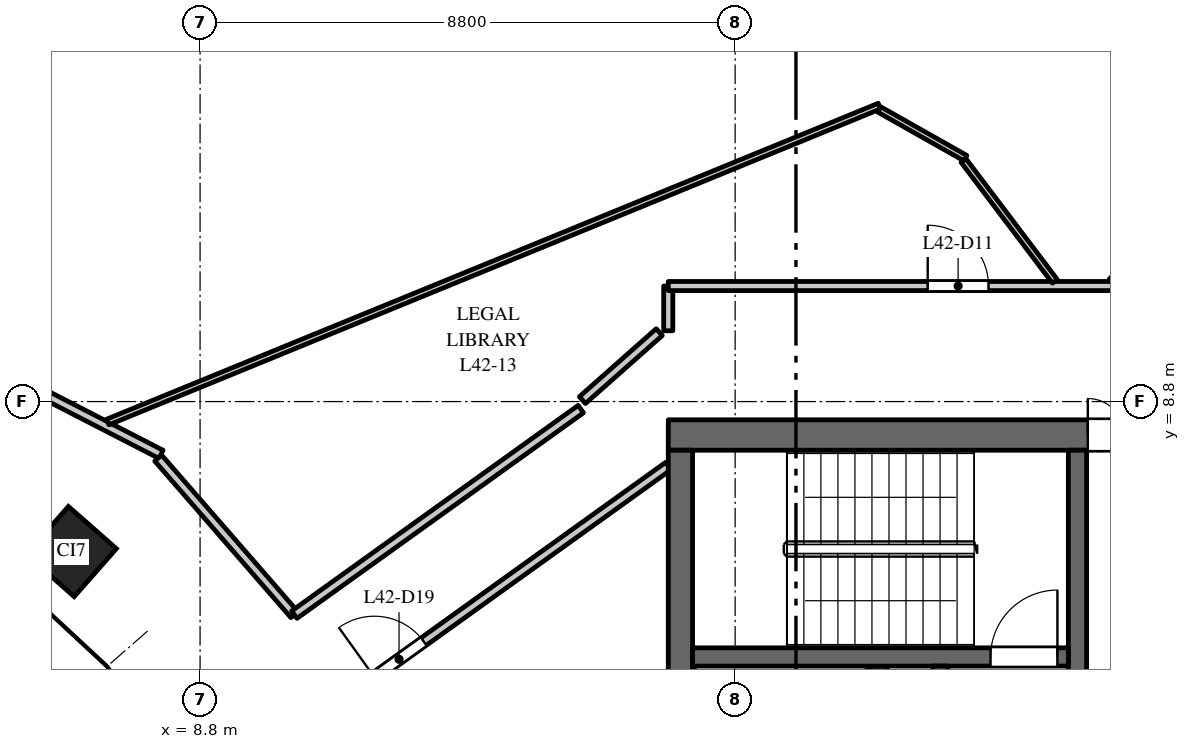
"""IFC4 building model, lengths in metres.
Left out: names, types, materials, properties, quantities, classifications, styles, units other than length and angle.
Written with IfcOpenShell. Run it as: python <this file> out.ifc"""

import sys

from ifc_helpers import new_model, si_unit, direction, frame, frame_2d, origin, origin_2d, place, context, subcontext, project, spatial, rectangle, extrude, element, fill, save


model = new_model("IFC4")
c1 = context("Model", 3, precision=1e-05, world=origin(), true_north=direction((0.0, 1.0)))
c2 = subcontext(c1, "Body", "Model", "MODEL_VIEW")
j1 = project(units=[si_unit("LENGTHUNIT", "METRE"), si_unit("PLANEANGLEUNIT", "RADIAN")], contexts=[c1])
p1 = place(None, origin())
s1 = spatial("IfcSite", under=j1, at=p1, CompositionType="ELEMENT")
p2 = place(p1, origin())
s2 = spatial("IfcBuilding", under=s1, at=p2, CompositionType="ELEMENT")
p3 = place(p2, frame((0.0, 0.0, 182.0)))
s3 = spatial("IfcBuildingStorey", under=s2, at=p3, CompositionType="ELEMENT", Elevation=182.0)
p4 = place(p3, frame((6.682, 6.334, 0.0), z_axis=(0.0, 0.0, 1.0), x_axis=(-0.75102249095, 0.660276622399, 0.0)))
e1 = element("IfcColumn", 1, at=p4, inside=s3, PredefinedType="COLUMN", context=c2, shape_type="SweptSolid", body=[
    extrude(rectangle(XDim=1.05, YDim=1.05, at=origin_2d()), origin(), (0.0, 0.0, 1.0), 4.0),
])
p5 = place(p3, frame((16.5, 8.25, 0.0), z_axis=(0.0, 0.0, 1.0), x_axis=(1.0, 0.0, 0.0)))
e2 = element("IfcWall", 2, at=p5, inside=s3, PredefinedType="SHEAR", context=c2, shape_type="SweptSolid", body=[
    extrude(rectangle(XDim=15.0, YDim=0.5, at=frame_2d((7.5, 0.0))), origin(), (0.0, 0.0, 1.0), 3.7),
])
p6 = place(p5, frame((6.9, 0.0, 0.0)))
e3 = element("IfcOpeningElement", 3, at=p6, cuts=e2, PredefinedType="OPENING", context=c2, shape_type="SweptSolid", body=[
    extrude(rectangle(XDim=1.2, YDim=2.1, at=frame_2d((0.6, 1.05))), frame((0.0, 0.26, 0.0), z_axis=(0.0, -1.0, 0.0), x_axis=(1.0, 0.0, 0.0)), (0.0, 0.0, 1.0), 0.52),
])
p7 = place(p5, frame((12.275, 0.0, 0.0)))
e4 = element("IfcOpeningElement", 4, at=p7, cuts=e2, PredefinedType="OPENING", context=c2, shape_type="SweptSolid", body=[
    extrude(rectangle(XDim=0.9, YDim=2.1, at=frame_2d((0.45, 1.05))), frame((0.0, 0.26, 0.0), z_axis=(0.0, -1.0, 0.0), x_axis=(1.0, 0.0, 0.0)), (0.0, 0.0, 1.0), 0.52),
])
p8 = place(p3, frame((19.95, -4.45, 0.0), z_axis=(0.0, 0.0, 1.0), x_axis=(0.0, 1.0, 0.0)))
e5 = element("IfcWall", 5, at=p8, inside=s3, PredefinedType="SHEAR", context=c2, shape_type="SweptSolid", body=[
    extrude(rectangle(XDim=8.9, YDim=0.3, at=frame_2d((4.45, 0.0))), origin(), (0.0, 0.0, 1.0), 3.7),
])
p9 = place(p8, frame((0.775, 0.0, 0.0)))
e6 = element("IfcOpeningElement", 6, at=p9, cuts=e5, PredefinedType="OPENING", context=c2, shape_type="SweptSolid", body=[
    extrude(rectangle(XDim=1.2, YDim=2.1, at=frame_2d((0.6, 1.05))), frame((0.0, 0.16, 0.0), z_axis=(0.0, -1.0, 0.0), x_axis=(1.0, 0.0, 0.0)), (0.0, 0.0, 1.0), 0.32),
])
p10 = place(p8, frame((4.675, 0.0, 0.0)))
e7 = element("IfcOpeningElement", 7, at=p10, cuts=e5, PredefinedType="OPENING", context=c2, shape_type="SweptSolid", body=[
    extrude(rectangle(XDim=1.1, YDim=2.1, at=frame_2d((0.55, 1.05))), frame((0.0, 0.16, 0.0), z_axis=(0.0, -1.0, 0.0), x_axis=(1.0, 0.0, 0.0)), (0.0, 0.0, 1.0), 0.32),
])
p11 = place(p8, frame((7.25, 0.0, 0.0)))
e8 = element("IfcOpeningElement", 8, at=p11, cuts=e5, PredefinedType="OPENING", context=c2, shape_type="SweptSolid", body=[
    extrude(rectangle(XDim=1.1, YDim=2.1, at=frame_2d((0.55, 1.05))), frame((0.0, 0.16, 0.0), z_axis=(0.0, -1.0, 0.0), x_axis=(1.0, 0.0, 0.0)), (0.0, 0.0, 1.0), 0.32),
])
p12 = place(p3, frame((16.7, -8.0, 0.0), z_axis=(0.0, 0.0, 1.0), x_axis=(0.0, 1.0, 0.0)))
e9 = element("IfcWall", 9, at=p12, inside=s3, PredefinedType="SHEAR", context=c2, shape_type="SweptSolid", body=[
    extrude(rectangle(XDim=16.0, YDim=0.4, at=frame_2d((8.0, 0.0))), origin(), (0.0, 0.0, 1.0), 3.7),
])
p13 = place(p3, frame((23.23, 2.25, 0.0), z_axis=(0.0, 0.0, 1.0), x_axis=(0.0, 1.0, 0.0)))
e10 = element("IfcWall", 10, at=p13, inside=s3, PredefinedType="SHEAR", context=c2, shape_type="SweptSolid", body=[
    extrude(rectangle(XDim=5.75, YDim=0.3, at=frame_2d((2.875, 0.0))), origin(), (0.0, 0.0, 1.0), 3.7),
])
p14 = place(p13, frame((0.6, 0.0, 0.0)))
e11 = element("IfcOpeningElement", 11, at=p14, cuts=e10, PredefinedType="OPENING", context=c2, shape_type="SweptSolid", body=[
    extrude(rectangle(XDim=1.0, YDim=2.1, at=frame_2d((0.5, 1.05))), frame((0.0, 0.16, 0.0), z_axis=(0.0, -1.0, 0.0), x_axis=(1.0, 0.0, 0.0)), (0.0, 0.0, 1.0), 0.32),
])
p15 = place(p3, frame((16.9, 4.6, 0.0), z_axis=(0.0, 0.0, 1.0), x_axis=(1.0, 0.0, 0.0)))
e12 = element("IfcWall", 12, at=p15, inside=s3, PredefinedType="SHEAR", context=c2, shape_type="SweptSolid", body=[
    extrude(rectangle(XDim=6.18, YDim=0.3, at=frame_2d((3.09, 0.0))), origin(), (0.0, 0.0, 1.0), 3.7),
])
p16 = place(p15, frame((4.9, 0.0, 0.0)))
e13 = element("IfcOpeningElement", 13, at=p16, cuts=e12, PredefinedType="OPENING", context=c2, shape_type="SweptSolid", body=[
    extrude(rectangle(XDim=1.1, YDim=2.1, at=frame_2d((0.55, 1.05))), frame((0.0, 0.16, 0.0), z_axis=(0.0, -1.0, 0.0), x_axis=(1.0, 0.0, 0.0)), (0.0, 0.0, 1.0), 0.32),
])
p17 = place(p3, frame((20.975, 2.25, 0.0), z_axis=(0.0, 0.0, 1.0), x_axis=(0.0, 1.0, 0.0)))
e14 = element("IfcWall", 14, at=p17, inside=s3, PredefinedType="SHEAR", context=c2, shape_type="SweptSolid", body=[
    extrude(rectangle(XDim=2.2, YDim=0.25, at=frame_2d((1.1, 0.0))), origin(), (0.0, 0.0, 1.0), 3.7),
])
p18 = place(p3, frame((4.337, 9.896, 0.0), z_axis=(0.0, 0.0, 1.0), x_axis=(0.889382211946, -0.457164391739, 0.0)))
e15 = element("IfcWall", 15, at=p18, inside=s3, PredefinedType="PARTITIONING", context=c2, shape_type="SweptSolid", body=[
    extrude(rectangle(XDim=4.296, YDim=0.15, at=frame_2d((2.148, 0.0))), origin(), (0.0, 0.0, 1.0), 2.85),
])
p19 = place(p3, frame((7.283, 8.464, 0.0), z_axis=(0.0, 0.0, 1.0), x_axis=(0.925447652154, 0.378875498182, 0.0)))
e16 = element("IfcWall", 16, at=p19, inside=s3, PredefinedType="PARTITIONING", context=c2, shape_type="SweptSolid", body=[
    extrude(rectangle(XDim=13.711, YDim=0.1, at=frame_2d((6.855, 0.0))), origin(), (0.0, 0.0, 1.0), 3.7),
])
p20 = place(p3, frame((8.111, 7.871, 0.0), z_axis=(0.0, 0.0, 1.0), x_axis=(0.656293818527, -0.754505416656, 0.0)))
e17 = element("IfcWall", 17, at=p20, inside=s3, PredefinedType="PARTITIONING", context=c2, shape_type="SweptSolid", body=[
    extrude(rectangle(XDim=3.413, YDim=0.15, at=frame_2d((1.707, 0.0))), origin(), (0.0, 0.0, 1.0), 2.75),
])
p21 = place(p3, frame((10.351, 5.296, 0.0), z_axis=(0.0, 0.0, 1.0), x_axis=(0.812494026232, 0.582969516645, 0.0)))
e18 = element("IfcWall", 18, at=p21, inside=s3, PredefinedType="PARTITIONING", context=c2, shape_type="SweptSolid", body=[
    extrude(rectangle(XDim=5.798, YDim=0.15, at=frame_2d((2.899, 0.0))), origin(), (0.0, 0.0, 1.0), 2.75),
])
p22 = place(p3, frame((11.203, 3.938, 0.0), z_axis=(0.0, 0.0, 1.0), x_axis=(0.812471543061, 0.583000850528, 0.0)))
e19 = element("IfcWall", 19, at=p22, inside=s3, PredefinedType="PARTITIONING", context=c2, shape_type="SweptSolid", body=[
    extrude(rectangle(XDim=6.52, YDim=0.15, at=frame_2d((3.26, 0.0))), origin(), (0.0, 0.0, 1.0), 3.7),
])
p23 = place(p22, frame((0.57, 0.0, 0.0)))
e20 = element("IfcOpeningElement", 20, at=p23, cuts=e19, PredefinedType="OPENING", context=c2, shape_type="SweptSolid", body=[
    extrude(rectangle(XDim=1.0, YDim=2.1, at=frame_2d((0.5, 1.05))), frame((0.0, 0.085, 0.0), z_axis=(0.0, -1.0, 0.0), x_axis=(1.0, 0.0, 0.0)), (0.0, 0.0, 1.0), 0.17),
])
p24 = place(p3, frame((16.5, 9.964, 0.0), z_axis=(0.0, 0.0, 1.0), x_axis=(0.0, 1.0, 0.0)))
e21 = element("IfcWall", 21, at=p24, inside=s3, PredefinedType="PARTITIONING", context=c2, shape_type="SweptSolid", body=[
    extrude(rectangle(XDim=0.736, YDim=0.15, at=frame_2d((0.368, 0.0))), origin(), (0.0, 0.0, 1.0), 3.7),
])
p25 = place(p3, frame((16.5, 10.7, 0.0), z_axis=(0.0, 0.0, 1.0), x_axis=(1.0, 0.0, 0.0)))
e22 = element("IfcWall", 22, at=p25, inside=s3, PredefinedType="PARTITIONING", context=c2, shape_type="SweptSolid", body=[
    extrude(rectangle(XDim=15.0, YDim=0.15, at=frame_2d((7.5, 0.0))), origin(), (0.0, 0.0, 1.0), 2.75),
])
p26 = place(p25, frame((4.267, 0.0, 0.0)))
e23 = element("IfcOpeningElement", 23, at=p26, cuts=e22, PredefinedType="OPENING", context=c2, shape_type="SweptSolid", body=[
    extrude(rectangle(XDim=1.0, YDim=2.1, at=frame_2d((0.5, 1.05))), frame((0.0, 0.085, 0.0), z_axis=(0.0, -1.0, 0.0), x_axis=(1.0, 0.0, 0.0)), (0.0, 0.0, 1.0), 0.17),
])
p27 = place(p25, frame((8.85, 0.0, 0.0)))
e24 = element("IfcOpeningElement", 24, at=p27, cuts=e22, PredefinedType="OPENING", context=c2, shape_type="SweptSolid", body=[
    extrude(rectangle(XDim=1.0, YDim=2.1, at=frame_2d((0.5, 1.05))), frame((0.0, 0.085, 0.0), z_axis=(0.0, -1.0, 0.0), x_axis=(1.0, 0.0, 0.0)), (0.0, 0.0, 1.0), 0.17),
])
p28 = place(p3, frame((19.969, 13.604, 0.0), z_axis=(0.0, 0.0, 1.0), x_axis=(0.870822239997, -0.491598033281, 0.0)))
e25 = element("IfcWall", 25, at=p28, inside=s3, PredefinedType="PARTITIONING", context=c2, shape_type="SweptSolid", body=[
    extrude(rectangle(XDim=1.629, YDim=0.1, at=frame_2d((0.815, 0.0))), origin(), (0.0, 0.0, 1.0), 3.7),
])
p29 = place(p3, frame((21.355, 12.765, 0.0), z_axis=(0.0, 0.0, 1.0), x_axis=(0.603287715996, -0.797523624558, 0.0)))
e26 = element("IfcWall", 26, at=p29, inside=s3, PredefinedType="PARTITIONING", context=c2, shape_type="SweptSolid", body=[
    extrude(rectangle(XDim=2.491, YDim=0.1, at=frame_2d((1.246, 0.0))), origin(), (0.0, 0.0, 1.0), 2.75),
])
p30 = place(p3, frame((23.785, 10.778, 0.0), z_axis=(0.0, 0.0, 1.0), x_axis=(0.748985701008, 0.662586160198, 0.0)))
e27 = element("IfcWall", 27, at=p30, inside=s3, PredefinedType="PARTITIONING", context=c2, shape_type="SweptSolid", body=[
    extrude(rectangle(XDim=7.723, YDim=0.1, at=frame_2d((3.861, 0.0))), origin(), (0.0, 0.0, 1.0), 2.75),
])
p31 = place(p3, frame((15.088, 8.824, 0.0), z_axis=(0.0, 0.0, 1.0), x_axis=(0.749107006374, 0.662449011624, 0.0)))
e28 = element("IfcWall", 28, at=p31, inside=s3, PredefinedType="PARTITIONING", context=c2, shape_type="SweptSolid", body=[
    extrude(rectangle(XDim=1.688, YDim=0.15, at=frame_2d((0.844, 0.0))), origin(), (0.0, 0.0, 1.0), 3.7),
])
p32 = place(p16, origin())
e29 = element("IfcDoor", 29, at=p32, inside=s3, OperationType="SINGLE_SWING_LEFT", PredefinedType="DOOR", context=c2, shape_type="SweptSolid", body=[
    extrude(rectangle(XDim=1.1, YDim=2.1, at=frame_2d((0.55, 1.05))), frame((0.0, 0.025, 0.0), z_axis=(0.0, -1.0, 0.0), x_axis=(1.0, 0.0, 0.0)), (0.0, 0.0, 1.0), 0.05),
])
fill(e13, e29)
p33 = place(p6, origin())
e30 = element("IfcDoor", 30, at=p33, inside=s3, OperationType="DOUBLE_DOOR_DOUBLE_SWING", PredefinedType="DOOR", context=c2, shape_type="SweptSolid", body=[
    extrude(rectangle(XDim=1.2, YDim=2.1, at=frame_2d((0.6, 1.05))), frame((0.0, 0.025, 0.0), z_axis=(0.0, -1.0, 0.0), x_axis=(1.0, 0.0, 0.0)), (0.0, 0.0, 1.0), 0.05),
])
fill(e3, e30)
p34 = place(p26, origin())
e31 = element("IfcDoor", 31, at=p34, inside=s3, OperationType="SINGLE_SWING_LEFT", PredefinedType="DOOR", context=c2, shape_type="SweptSolid", body=[
    extrude(rectangle(XDim=1.0, YDim=2.1, at=frame_2d((0.5, 1.05))), frame((0.0, 0.025, 0.0), z_axis=(0.0, -1.0, 0.0), x_axis=(1.0, 0.0, 0.0)), (0.0, 0.0, 1.0), 0.05),
])
fill(e23, e31)
p35 = place(p23, origin())
e32 = element("IfcDoor", 32, at=p35, inside=s3, OperationType="SINGLE_SWING_LEFT", PredefinedType="DOOR", context=c2, shape_type="SweptSolid", body=[
    extrude(rectangle(XDim=1.0, YDim=2.1, at=frame_2d((0.5, 1.05))), frame((0.0, 0.025, 0.0), z_axis=(0.0, -1.0, 0.0), x_axis=(1.0, 0.0, 0.0)), (0.0, 0.0, 1.0), 0.05),
])
fill(e20, e32)
save(model, sys.argv[1])
